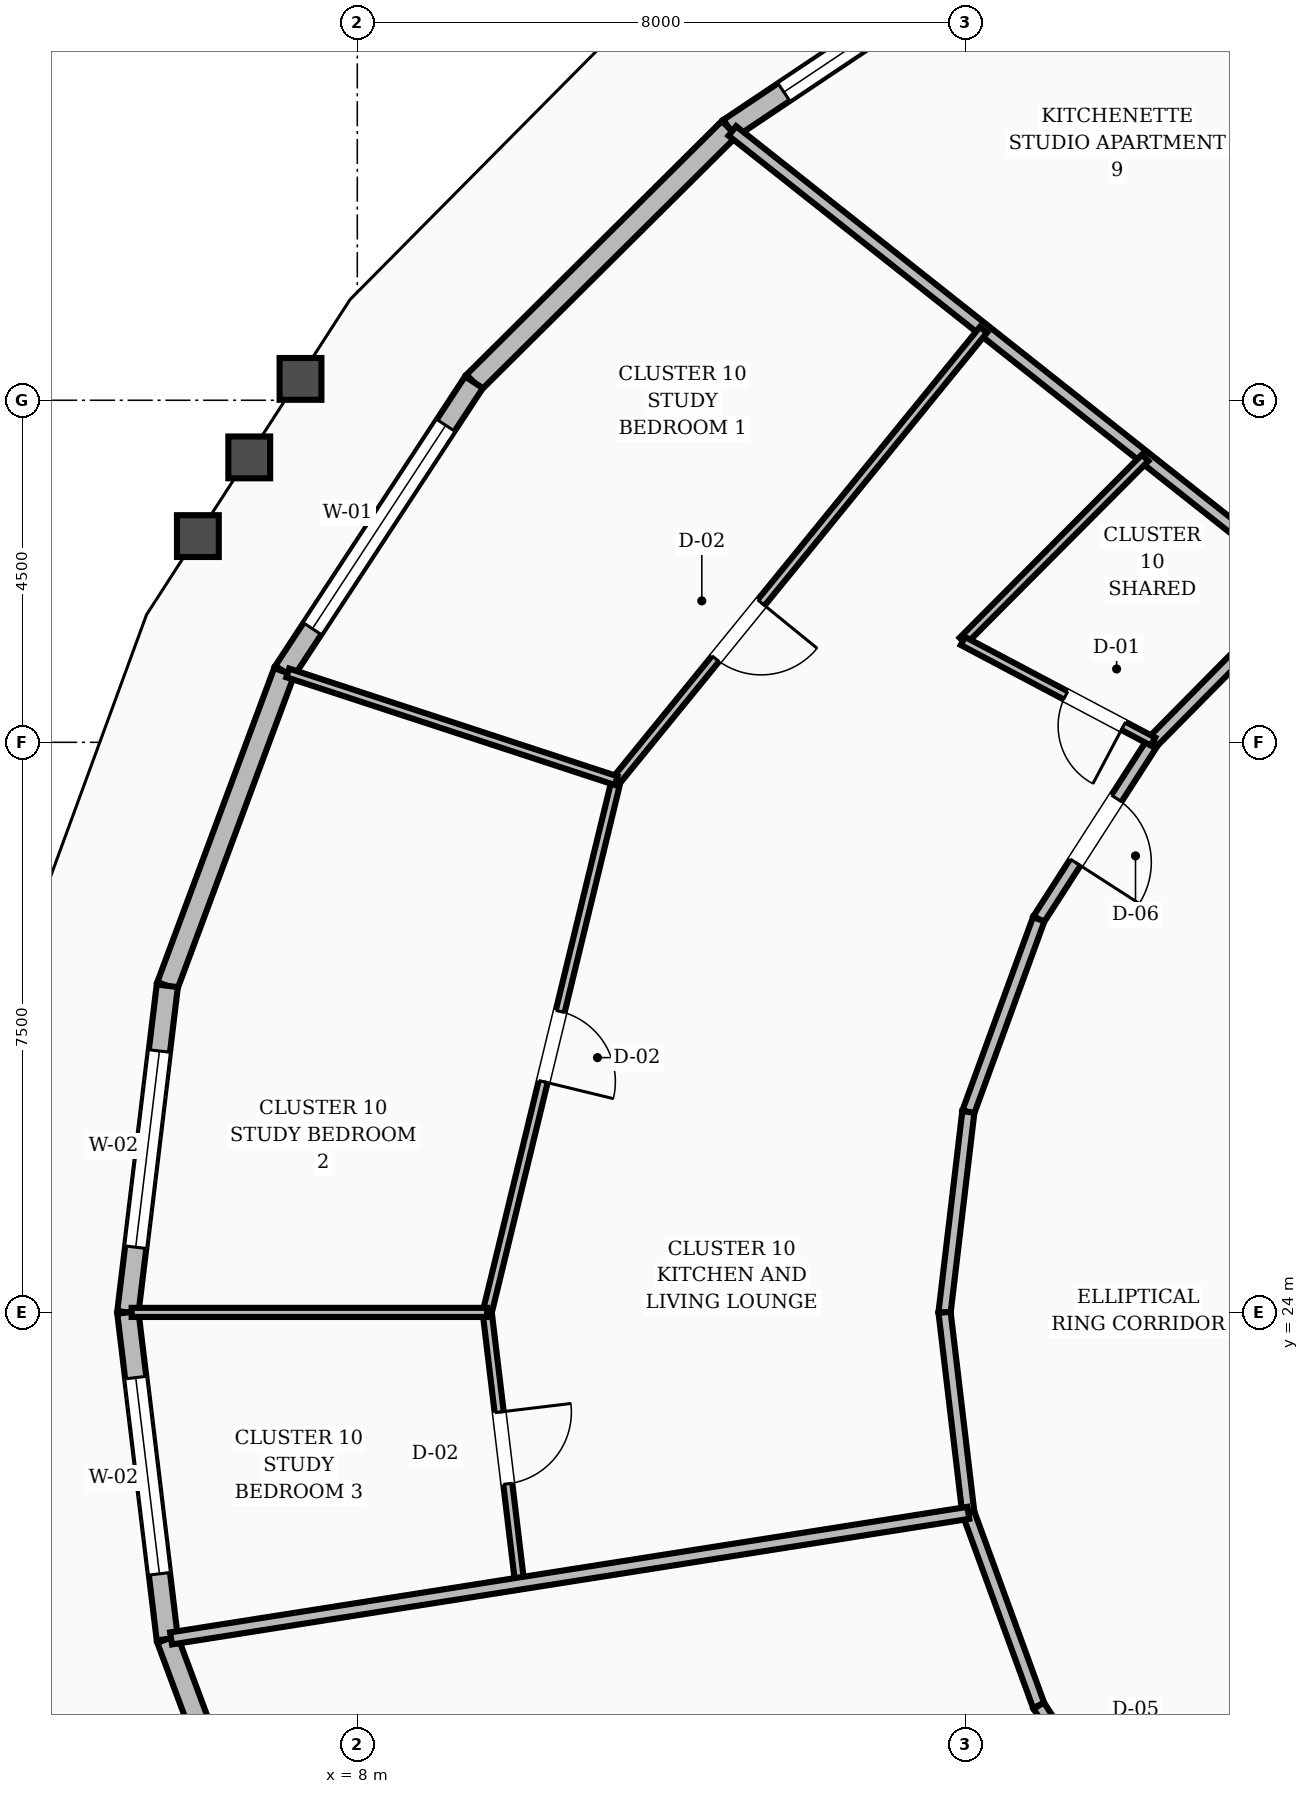
"""IFC4 building model, lengths in metres.
Left out: names, types, materials, properties, quantities, classifications, styles, units other than length and angle.
Written with IfcOpenShell. Run it as: python <this file> out.ifc"""

import sys

from ifc_helpers import new_model, si_unit, direction, frame, frame_2d, origin, place, context, subcontext, project, spatial, rectangle, extrude, element, fill, save


model = new_model("IFC4")
c1 = context("Model", 3, precision=1e-05, world=origin(), true_north=direction((0.0, 1.0)))
c2 = subcontext(c1, "Body", "Model", "MODEL_VIEW")
j1 = project(units=[si_unit("LENGTHUNIT", "METRE"), si_unit("PLANEANGLEUNIT", "RADIAN")], contexts=[c1])
p1 = place(None, origin())
s1 = spatial("IfcSite", under=j1, at=p1, CompositionType="ELEMENT")
p2 = place(p1, origin())
s2 = spatial("IfcBuilding", under=s1, at=p2, CompositionType="ELEMENT")
p3 = place(p2, frame((0.0, 0.0, 84.4)))
s3 = spatial("IfcBuildingStorey", under=s2, at=p3, CompositionType="ELEMENT", Elevation=84.4)
p4 = place(p3, frame((16.989, 42.313, 0.0), z_axis=(0.0, 0.0, 1.0), x_axis=(-0.831134194268, -0.55607189384, 0.0)))
e1 = element("IfcWall", 1, at=p4, inside=s3, PredefinedType="STANDARD", context=c2, shape_type="SweptSolid", body=[
    extrude(rectangle(XDim=4.926, YDim=0.28, at=frame_2d((2.463, 0.0))), origin(), (0.0, 0.0, 1.0), 2.71),
])
p5 = place(p4, frame((0.863, 0.0, 0.8)))
e2 = element("IfcOpeningElement", 2, at=p5, cuts=e1, PredefinedType="OPENING", context=c2, shape_type="SweptSolid", body=[
    extrude(rectangle(XDim=3.2, YDim=1.65, at=frame_2d((1.6, 0.825))), frame((0.0, 0.15, 0.0), z_axis=(0.0, -1.0, 0.0), x_axis=(1.0, 0.0, 0.0)), (0.0, 0.0, 1.0), 0.3),
])
p6 = place(p3, frame((12.895, 39.574, 0.0), z_axis=(0.0, 0.0, 1.0), x_axis=(-0.709499676925, -0.704705760189, 0.0)))
e3 = element("IfcWall", 3, at=p6, inside=s3, PredefinedType="STANDARD", context=c2, shape_type="SweptSolid", body=[
    extrude(rectangle(XDim=4.736, YDim=0.28, at=frame_2d((2.368, 0.0))), origin(), (0.0, 0.0, 1.0), 2.71),
])
p7 = place(p3, frame((9.534, 36.237, 0.0), z_axis=(0.0, 0.0, 1.0), x_axis=(-0.548336678248, -0.836257668, 0.0)))
e4 = element("IfcWall", 4, at=p7, inside=s3, PredefinedType="STANDARD", context=c2, shape_type="SweptSolid", body=[
    extrude(rectangle(XDim=4.553, YDim=0.28, at=frame_2d((2.277, 0.0))), origin(), (0.0, 0.0, 1.0), 2.71),
])
p8 = place(p7, frame((0.677, 0.0, 0.8)))
e5 = element("IfcOpeningElement", 5, at=p8, cuts=e4, PredefinedType="OPENING", context=c2, shape_type="SweptSolid", body=[
    extrude(rectangle(XDim=3.2, YDim=1.65, at=frame_2d((1.6, 0.825))), frame((0.0, 0.15, 0.0), z_axis=(0.0, -1.0, 0.0), x_axis=(1.0, 0.0, 0.0)), (0.0, 0.0, 1.0), 0.3),
])
p9 = place(p3, frame((7.038, 32.429, 0.0), z_axis=(0.0, 0.0, 1.0), x_axis=(-0.348719005739, -0.937227323031, 0.0)))
e6 = element("IfcWall", 6, at=p9, inside=s3, PredefinedType="STANDARD", context=c2, shape_type="SweptSolid", body=[
    extrude(rectangle(XDim=4.409, YDim=0.28, at=frame_2d((2.204, 0.0))), origin(), (0.0, 0.0, 1.0), 2.71),
])
p10 = place(p3, frame((5.5, 28.297, 0.0), z_axis=(0.0, 0.0, 1.0), x_axis=(-0.119979283707, -0.99277639551, 0.0)))
e7 = element("IfcWall", 7, at=p10, inside=s3, PredefinedType="STANDARD", context=c2, shape_type="SweptSolid", body=[
    extrude(rectangle(XDim=4.328, YDim=0.28, at=frame_2d((2.164, 0.0))), origin(), (0.0, 0.0, 1.0), 2.71),
])
p11 = place(p10, frame((0.864, 0.0, 0.8)))
e8 = element("IfcOpeningElement", 8, at=p11, cuts=e7, PredefinedType="OPENING", context=c2, shape_type="SweptSolid", body=[
    extrude(rectangle(XDim=2.6, YDim=1.65, at=frame_2d((1.3, 0.825))), frame((0.0, 0.15, 0.0), z_axis=(0.0, -1.0, 0.0), x_axis=(1.0, 0.0, 0.0)), (0.0, 0.0, 1.0), 0.3),
])
p12 = place(p3, frame((4.981, 24.0, 0.0), z_axis=(0.0, 0.0, 1.0), x_axis=(0.119979283707, -0.99277639551, 0.0)))
e9 = element("IfcWall", 9, at=p12, inside=s3, PredefinedType="STANDARD", context=c2, shape_type="SweptSolid", body=[
    extrude(rectangle(XDim=4.328, YDim=0.28, at=frame_2d((2.164, 0.0))), origin(), (0.0, 0.0, 1.0), 2.71),
])
p13 = place(p12, frame((0.864, 0.0, 0.8)))
e10 = element("IfcOpeningElement", 10, at=p13, cuts=e9, PredefinedType="OPENING", context=c2, shape_type="SweptSolid", body=[
    extrude(rectangle(XDim=2.6, YDim=1.65, at=frame_2d((1.3, 0.825))), frame((0.0, 0.15, 0.0), z_axis=(0.0, -1.0, 0.0), x_axis=(1.0, 0.0, 0.0)), (0.0, 0.0, 1.0), 0.3),
])
p14 = place(p3, frame((5.5, 19.703, 0.0), z_axis=(0.0, 0.0, 1.0), x_axis=(0.348719005739, -0.937227323031, 0.0)))
e11 = element("IfcWall", 11, at=p14, inside=s3, PredefinedType="STANDARD", context=c2, shape_type="SweptSolid", body=[
    extrude(rectangle(XDim=4.409, YDim=0.28, at=frame_2d((2.204, 0.0))), origin(), (0.0, 0.0, 1.0), 2.71),
])
p15 = place(p3, frame((20.492, 33.559, 0.0), z_axis=(0.0, 0.0, 1.0), x_axis=(-0.702811997, -0.711375636969, 0.0)))
e12 = element("IfcWall", 12, at=p15, inside=s3, PredefinedType="SOLIDWALL", context=c2, shape_type="SweptSolid", body=[
    extrude(rectangle(XDim=2.879, YDim=0.16, at=frame_2d((1.44, 0.0))), origin(), (0.0, 0.0, 1.0), 2.71),
])
p16 = place(p3, frame((18.469, 31.51, 0.0), z_axis=(0.0, 0.0, 1.0), x_axis=(-0.541126045017, -0.840941498206, 0.0)))
e13 = element("IfcWall", 13, at=p16, inside=s3, PredefinedType="SOLIDWALL", context=c2, shape_type="SweptSolid", body=[
    extrude(rectangle(XDim=2.779, YDim=0.16, at=frame_2d((1.39, 0.0))), origin(), (0.0, 0.0, 1.0), 2.71),
])
p17 = place(p16, frame((0.89, 0.0, 0.0)))
e14 = element("IfcOpeningElement", 14, at=p17, cuts=e13, PredefinedType="OPENING", context=c2, shape_type="SweptSolid", body=[
    extrude(rectangle(XDim=1.0, YDim=2.1, at=frame_2d((0.5, 1.05))), frame((0.0, 0.09, 0.0), z_axis=(0.0, -1.0, 0.0), x_axis=(1.0, 0.0, 0.0)), (0.0, 0.0, 1.0), 0.18),
])
p18 = place(p3, frame((16.965, 29.173, 0.0), z_axis=(0.0, 0.0, 1.0), x_axis=(-0.343013437329, -0.939330496583, 0.0)))
e15 = element("IfcWall", 15, at=p18, inside=s3, PredefinedType="SOLIDWALL", context=c2, shape_type="SweptSolid", body=[
    extrude(rectangle(XDim=2.7, YDim=0.16, at=frame_2d((1.35, 0.0))), origin(), (0.0, 0.0, 1.0), 2.71),
])
for number, where, z_axis, x_axis in (
    (16, (16.039, 26.637, 0.0), (0.0, 0.0, 1.0), (-0.118, -0.993, 0.0)),
    (17, (15.726, 24.0, 0.0), (0.0, 0.0, 1.0), (0.118, -0.993, 0.0)),
):
    element("IfcWall", number, at=place(p3, frame(where, z_axis=z_axis, x_axis=x_axis)), inside=s3, PredefinedType="SOLIDWALL", context=c2, shape_type="SweptSolid", body=[
        extrude(rectangle(XDim=2.656, YDim=0.16, at=frame_2d((1.328, 0.0))), origin(), (0.0, 0.0, 1.0), 2.71),
    ])
p19 = place(p3, frame((16.039, 21.363, 0.0), z_axis=(0.0, 0.0, 1.0), x_axis=(0.343013437329, -0.939330496583, 0.0)))
e18 = element("IfcWall", 18, at=p19, inside=s3, PredefinedType="SOLIDWALL", context=c2, shape_type="SweptSolid", body=[
    extrude(rectangle(XDim=2.7, YDim=0.16, at=frame_2d((1.35, 0.0))), origin(), (0.0, 0.0, 1.0), 2.71),
])
p20 = place(p3, frame((16.965, 18.827, 0.0), z_axis=(0.0, 0.0, 1.0), x_axis=(0.541126045017, -0.840941498206, 0.0)))
e19 = element("IfcWall", 19, at=p20, inside=s3, PredefinedType="SOLIDWALL", context=c2, shape_type="SweptSolid", body=[
    extrude(rectangle(XDim=2.779, YDim=0.16, at=frame_2d((1.39, 0.0))), origin(), (0.0, 0.0, 1.0), 2.71),
])
p21 = place(p20, frame((0.89, 0.0, 0.0)))
e20 = element("IfcOpeningElement", 20, at=p21, cuts=e19, PredefinedType="OPENING", context=c2, shape_type="SweptSolid", body=[
    extrude(rectangle(XDim=1.0, YDim=2.1, at=frame_2d((0.5, 1.05))), frame((0.0, 0.09, 0.0), z_axis=(0.0, -1.0, 0.0), x_axis=(1.0, 0.0, 0.0)), (0.0, 0.0, 1.0), 0.18),
])
p22 = place(p3, frame((20.492, 33.559, 0.0), z_axis=(0.0, 0.0, 1.0), x_axis=(-0.784008851618, 0.620749644047, 0.0)))
e21 = element("IfcWall", 21, at=p22, inside=s3, PredefinedType="SOLIDWALL", context=c2, shape_type="SweptSolid", body=[
    extrude(rectangle(XDim=9.641, YDim=0.16, at=frame_2d((4.82, 0.0))), origin(), (0.0, 0.0, 1.0), 2.71),
])
p23 = place(p3, frame((18.365, 35.243, 0.0), z_axis=(0.0, 0.0, 1.0), x_axis=(-0.705416994653, -0.708792539221, 0.0)))
e22 = element("IfcWall", 22, at=p23, inside=s3, PredefinedType="PARTITIONING", context=c2, shape_type="SweptSolid", body=[
    extrude(rectangle(XDim=3.399, YDim=0.12, at=frame_2d((1.7, 0.0))), origin(), (0.0, 0.0, 1.0), 2.71),
])
p24 = place(p3, frame((18.469, 31.51, 0.0), z_axis=(0.0, 0.0, 1.0), x_axis=(-0.883962018059, 0.467558713563, 0.0)))
e23 = element("IfcWall", 23, at=p24, inside=s3, PredefinedType="PARTITIONING", context=c2, shape_type="SweptSolid", body=[
    extrude(rectangle(XDim=2.83, YDim=0.12, at=frame_2d((1.415, 0.0))), origin(), (0.0, 0.0, 1.0), 2.71),
])
p25 = place(p24, frame((0.44, 0.0, 0.0)))
e24 = element("IfcOpeningElement", 24, at=p25, cuts=e23, PredefinedType="OPENING", context=c2, shape_type="SweptSolid", body=[
    extrude(rectangle(XDim=0.86, YDim=2.1, at=frame_2d((0.43, 1.05))), frame((0.0, 0.07, 0.0), z_axis=(0.0, -1.0, 0.0), x_axis=(1.0, 0.0, 0.0)), (0.0, 0.0, 1.0), 0.14),
])
p26 = place(p3, frame((16.238, 36.927, 0.0), z_axis=(0.0, 0.0, 1.0), x_axis=(-0.631616835391, -0.7752807061, 0.0)))
e25 = element("IfcWall", 25, at=p26, inside=s3, PredefinedType="PARTITIONING", context=c2, shape_type="SweptSolid", body=[
    extrude(rectangle(XDim=7.651, YDim=0.12, at=frame_2d((3.825, 0.0))), origin(), (0.0, 0.0, 1.0), 2.71),
])
p27 = place(p26, frame((4.631, 0.0, 0.0)))
e26 = element("IfcOpeningElement", 26, at=p27, cuts=e25, PredefinedType="OPENING", context=c2, shape_type="SweptSolid", body=[
    extrude(rectangle(XDim=0.95, YDim=2.1, at=frame_2d((0.475, 1.05))), frame((0.0, 0.07, 0.0), z_axis=(0.0, -1.0, 0.0), x_axis=(1.0, 0.0, 0.0)), (0.0, 0.0, 1.0), 0.14),
])
p28 = place(p3, frame((11.406, 30.996, 0.0), z_axis=(0.0, 0.0, 1.0), x_axis=(-0.235699029551, -0.971826099397, 0.0)))
e27 = element("IfcWall", 27, at=p28, inside=s3, PredefinedType="PARTITIONING", context=c2, shape_type="SweptSolid", body=[
    extrude(rectangle(XDim=7.199, YDim=0.12, at=frame_2d((3.6, 0.0))), origin(), (0.0, 0.0, 1.0), 2.71),
])
p29 = place(p28, frame((3.125, 0.0, 0.0)))
e28 = element("IfcOpeningElement", 28, at=p29, cuts=e27, PredefinedType="OPENING", context=c2, shape_type="SweptSolid", body=[
    extrude(rectangle(XDim=0.95, YDim=2.1, at=frame_2d((0.475, 1.05))), frame((0.0, 0.07, 0.0), z_axis=(0.0, -1.0, 0.0), x_axis=(1.0, 0.0, 0.0)), (0.0, 0.0, 1.0), 0.14),
])
p30 = place(p3, frame((11.406, 30.996, 0.0), z_axis=(0.0, 0.0, 1.0), x_axis=(-0.950197222086, 0.311649224513, 0.0)))
e29 = element("IfcWall", 29, at=p30, inside=s3, PredefinedType="PARTITIONING", context=c2, shape_type="SweptSolid", body=[
    extrude(rectangle(XDim=4.547, YDim=0.12, at=frame_2d((2.273, 0.0))), origin(), (0.0, 0.0, 1.0), 2.71),
])
p31 = place(p3, frame((9.709, 24.0, 0.0), z_axis=(0.0, 0.0, 1.0), x_axis=(0.119273854906, -0.992861393919, 0.0)))
e30 = element("IfcWall", 30, at=p31, inside=s3, PredefinedType="PARTITIONING", context=c2, shape_type="SweptSolid", body=[
    extrude(rectangle(XDim=3.592, YDim=0.12, at=frame_2d((1.796, 0.0))), origin(), (0.0, 0.0, 1.0), 2.71),
])
p32 = place(p31, frame((1.321, 0.0, 0.0)))
e31 = element("IfcOpeningElement", 31, at=p32, cuts=e30, PredefinedType="OPENING", context=c2, shape_type="SweptSolid", body=[
    extrude(rectangle(XDim=0.95, YDim=2.1, at=frame_2d((0.475, 1.05))), frame((0.0, 0.07, 0.0), z_axis=(0.0, -1.0, 0.0), x_axis=(1.0, 0.0, 0.0)), (0.0, 0.0, 1.0), 0.14),
])
p33 = place(p3, frame((9.709, 24.0, 0.0), z_axis=(0.0, 0.0, 1.0), x_axis=(-1.0, 0.0, 0.0)))
e32 = element("IfcWall", 32, at=p33, inside=s3, PredefinedType="PARTITIONING", context=c2, shape_type="SweptSolid", body=[
    extrude(rectangle(XDim=4.678, YDim=0.12, at=frame_2d((2.339, 0.0))), origin(), (0.0, 0.0, 1.0), 2.71),
])
p34 = place(p3, frame((16.039, 21.363, 0.0), z_axis=(0.0, 0.0, 1.0), x_axis=(-0.987825895071, -0.15556349516, 0.0)))
e33 = element("IfcWall", 33, at=p34, inside=s3, PredefinedType="SOLIDWALL", context=c2, shape_type="SweptSolid", body=[
    extrude(rectangle(XDim=10.618, YDim=0.16, at=frame_2d((5.309, 0.0))), origin(), (0.0, 0.0, 1.0), 2.71),
])
p35 = place(p5, origin())
e34 = element("IfcWindow", 34, at=p35, inside=s3, PartitioningType="SINGLE_PANEL", PredefinedType="WINDOW", context=c2, shape_type="SweptSolid", body=[
    extrude(rectangle(XDim=3.2, YDim=1.65, at=frame_2d((1.6, 0.825))), frame((0.0, 0.03, 0.0), z_axis=(0.0, -1.0, 0.0), x_axis=(1.0, 0.0, 0.0)), (0.0, 0.0, 1.0), 0.06),
])
fill(e2, e34)
p36 = place(p8, origin())
e35 = element("IfcWindow", 35, at=p36, inside=s3, PartitioningType="SINGLE_PANEL", PredefinedType="WINDOW", context=c2, shape_type="SweptSolid", body=[
    extrude(rectangle(XDim=3.2, YDim=1.65, at=frame_2d((1.6, 0.825))), frame((0.0, 0.03, 0.0), z_axis=(0.0, -1.0, 0.0), x_axis=(1.0, 0.0, 0.0)), (0.0, 0.0, 1.0), 0.06),
])
fill(e5, e35)
p37 = place(p11, origin())
e36 = element("IfcWindow", 36, at=p37, inside=s3, PartitioningType="SINGLE_PANEL", PredefinedType="WINDOW", context=c2, shape_type="SweptSolid", body=[
    extrude(rectangle(XDim=2.6, YDim=1.65, at=frame_2d((1.3, 0.825))), frame((0.0, 0.03, 0.0), z_axis=(0.0, -1.0, 0.0), x_axis=(1.0, 0.0, 0.0)), (0.0, 0.0, 1.0), 0.06),
])
fill(e8, e36)
p38 = place(p13, origin())
e37 = element("IfcWindow", 37, at=p38, inside=s3, PartitioningType="SINGLE_PANEL", PredefinedType="WINDOW", context=c2, shape_type="SweptSolid", body=[
    extrude(rectangle(XDim=2.6, YDim=1.65, at=frame_2d((1.3, 0.825))), frame((0.0, 0.03, 0.0), z_axis=(0.0, -1.0, 0.0), x_axis=(1.0, 0.0, 0.0)), (0.0, 0.0, 1.0), 0.06),
])
fill(e10, e37)
p39 = place(p25, origin())
e38 = element("IfcDoor", 38, at=p39, inside=s3, OperationType="SINGLE_SWING_LEFT", PredefinedType="DOOR", context=c2, shape_type="SweptSolid", body=[
    extrude(rectangle(XDim=0.86, YDim=2.1, at=frame_2d((0.43, 1.05))), frame((0.0, 0.025, 0.0), z_axis=(0.0, -1.0, 0.0), x_axis=(1.0, 0.0, 0.0)), (0.0, 0.0, 1.0), 0.05),
])
fill(e24, e38)
p40 = place(p17, origin())
e39 = element("IfcDoor", 39, at=p40, inside=s3, OperationType="SINGLE_SWING_RIGHT", PredefinedType="DOOR", context=c2, shape_type="SweptSolid", body=[
    extrude(rectangle(XDim=1.0, YDim=2.1, at=frame_2d((0.5, 1.05))), frame((0.0, 0.025, 0.0), z_axis=(0.0, -1.0, 0.0), x_axis=(1.0, 0.0, 0.0)), (0.0, 0.0, 1.0), 0.05),
])
fill(e14, e39)
p41 = place(p27, origin())
e40 = element("IfcDoor", 40, at=p41, inside=s3, OperationType="SINGLE_SWING_LEFT", PredefinedType="DOOR", context=c2, shape_type="SweptSolid", body=[
    extrude(rectangle(XDim=0.95, YDim=2.1, at=frame_2d((0.475, 1.05))), frame((0.0, 0.025, 0.0), z_axis=(0.0, -1.0, 0.0), x_axis=(1.0, 0.0, 0.0)), (0.0, 0.0, 1.0), 0.05),
])
fill(e26, e40)
p42 = place(p29, origin())
e41 = element("IfcDoor", 41, at=p42, inside=s3, OperationType="SINGLE_SWING_RIGHT", PredefinedType="DOOR", context=c2, shape_type="SweptSolid", body=[
    extrude(rectangle(XDim=0.95, YDim=2.1, at=frame_2d((0.475, 1.05))), frame((0.0, 0.025, 0.0), z_axis=(0.0, -1.0, 0.0), x_axis=(1.0, 0.0, 0.0)), (0.0, 0.0, 1.0), 0.05),
])
fill(e28, e41)
p43 = place(p32, origin())
e42 = element("IfcDoor", 42, at=p43, inside=s3, OperationType="SINGLE_SWING_LEFT", PredefinedType="DOOR", context=c2, shape_type="SweptSolid", body=[
    extrude(rectangle(XDim=0.95, YDim=2.1, at=frame_2d((0.475, 1.05))), frame((0.0, 0.025, 0.0), z_axis=(0.0, -1.0, 0.0), x_axis=(1.0, 0.0, 0.0)), (0.0, 0.0, 1.0), 0.05),
])
fill(e31, e42)
save(model, sys.argv[1])
